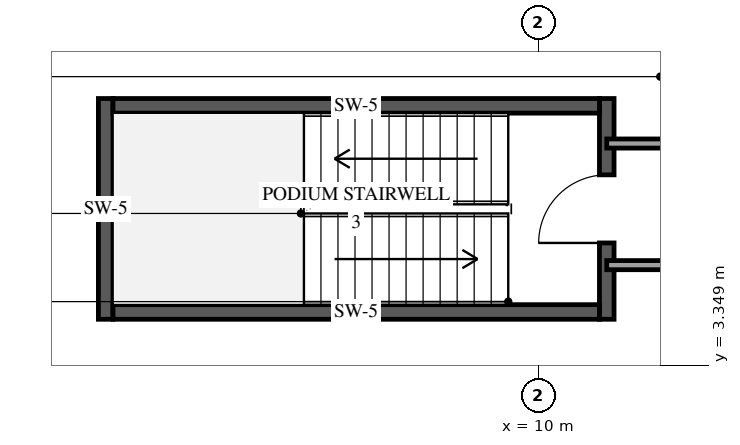
"""IFC4 building model, lengths in metres.
Left out: names, types, materials, properties, quantities, classifications, styles, units other than length and angle.
Written with IfcOpenShell. Run it as: python <this file> out.ifc"""

import sys

from ifc_helpers import new_model, si_unit, direction, frame, frame_2d, origin, place, context, subcontext, project, spatial, rectangle, extrude, element, fill, save


model = new_model("IFC4")
c1 = context("Model", 3, precision=1e-05, world=origin(), true_north=direction((0.0, 1.0)))
c2 = subcontext(c1, "Body", "Model", "MODEL_VIEW")
j1 = project(units=[si_unit("LENGTHUNIT", "METRE"), si_unit("PLANEANGLEUNIT", "RADIAN")], contexts=[c1])
p1 = place(None, origin())
s1 = spatial("IfcSite", under=j1, at=p1, CompositionType="ELEMENT")
p2 = place(p1, origin())
s2 = spatial("IfcBuilding", under=s1, at=p2, CompositionType="ELEMENT")
p3 = place(p2, frame((0.0, 0.0, 20.7)))
s3 = spatial("IfcBuildingStorey", under=s2, at=p3, CompositionType="ELEMENT", Elevation=20.7)
p4 = place(p3, frame((2.88, 4.11, 0.0), z_axis=(0.0, 0.0, 1.0), x_axis=(0.0, 1.0, 0.0)))
e1 = element("IfcWall", 1, at=p4, inside=s3, PredefinedType="SHEAR", context=c2, shape_type="SweptSolid", body=[
    extrude(rectangle(XDim=3.63, YDim=0.24, at=frame_2d((1.815, 0.0))), origin(), (0.0, 0.0, 1.0), 4.5),
])
p5 = place(p3, frame((11.12, 4.11, 0.0), z_axis=(0.0, 0.0, 1.0), x_axis=(0.0, 1.0, 0.0)))
e2 = element("IfcWall", 2, at=p5, inside=s3, PredefinedType="SHEAR", context=c2, shape_type="SweptSolid", body=[
    extrude(rectangle(XDim=3.63, YDim=0.24, at=frame_2d((1.815, 0.0))), origin(), (0.0, 0.0, 1.0), 4.5),
])
p6 = place(p5, frame((1.255, 0.0, 0.0)))
e3 = element("IfcOpeningElement", 3, at=p6, cuts=e2, PredefinedType="OPENING", context=c2, shape_type="SweptSolid", body=[
    extrude(rectangle(XDim=1.12, YDim=2.15, at=frame_2d((0.56, 1.075))), frame((0.0, 0.13, 0.0), z_axis=(0.0, -1.0, 0.0), x_axis=(1.0, 0.0, 0.0)), (0.0, 0.0, 1.0), 0.26),
])
for number, where, z_axis, x_axis in (
    (4, (3.0, 4.23, 0.0), (0.0, 0.0, 1.0), (1.0, 0.0, 0.0)),
    (5, (3.0, 7.62, 0.0), (0.0, 0.0, 1.0), (1.0, 0.0, 0.0)),
):
    element("IfcWall", number, at=place(p3, frame(where, z_axis=z_axis, x_axis=x_axis)), inside=s3, PredefinedType="SHEAR", context=c2, shape_type="SweptSolid", body=[
        extrude(rectangle(XDim=8.0, YDim=0.24, at=frame_2d((4.0, 0.0))), origin(), (0.0, 0.0, 1.0), 4.5),
    ])
p7 = place(p3, frame((46.73, 5.0, 0.0), z_axis=(0.0, 0.0, 1.0), x_axis=(-1.0, 0.0, 0.0)))
e6 = element("IfcWall", 6, at=p7, inside=s3, PredefinedType="PARTITIONING", context=c2, shape_type="SweptSolid", body=[
    extrude(rectangle(XDim=35.61, YDim=0.15, at=frame_2d((17.805, 0.0))), origin(), (0.0, 0.0, 1.0), 4.18),
])
p8 = place(p7, frame((17.33, 0.0, 0.0)))
e7 = element("IfcOpeningElement", 7, at=p8, cuts=e6, PredefinedType="OPENING", context=c2, shape_type="SweptSolid", body=[
    extrude(rectangle(XDim=0.92, YDim=2.12, at=frame_2d((0.46, 1.06))), frame((0.0, 0.085, 0.0), z_axis=(0.0, -1.0, 0.0), x_axis=(1.0, 0.0, 0.0)), (0.0, 0.0, 1.0), 0.17),
])
p9 = place(p3, frame((11.12, 7.0, 0.0), z_axis=(0.0, 0.0, 1.0), x_axis=(1.0, 0.0, 0.0)))
e8 = element("IfcWall", 8, at=p9, inside=s3, PredefinedType="PARTITIONING", context=c2, shape_type="SweptSolid", body=[
    extrude(rectangle(XDim=19.41, YDim=0.15, at=frame_2d((9.705, 0.0))), origin(), (0.0, 0.0, 1.0), 4.18),
])
p10 = place(p6, origin())
e9 = element("IfcDoor", 9, at=p10, inside=s3, OperationType="SINGLE_SWING_LEFT", PredefinedType="DOOR", context=c2, shape_type="SweptSolid", body=[
    extrude(rectangle(XDim=1.12, YDim=2.15, at=frame_2d((0.56, 1.075))), frame((0.0, 0.025, 0.0), z_axis=(0.0, -1.0, 0.0), x_axis=(1.0, 0.0, 0.0)), (0.0, 0.0, 1.0), 0.05),
])
fill(e3, e9)
save(model, sys.argv[1])
